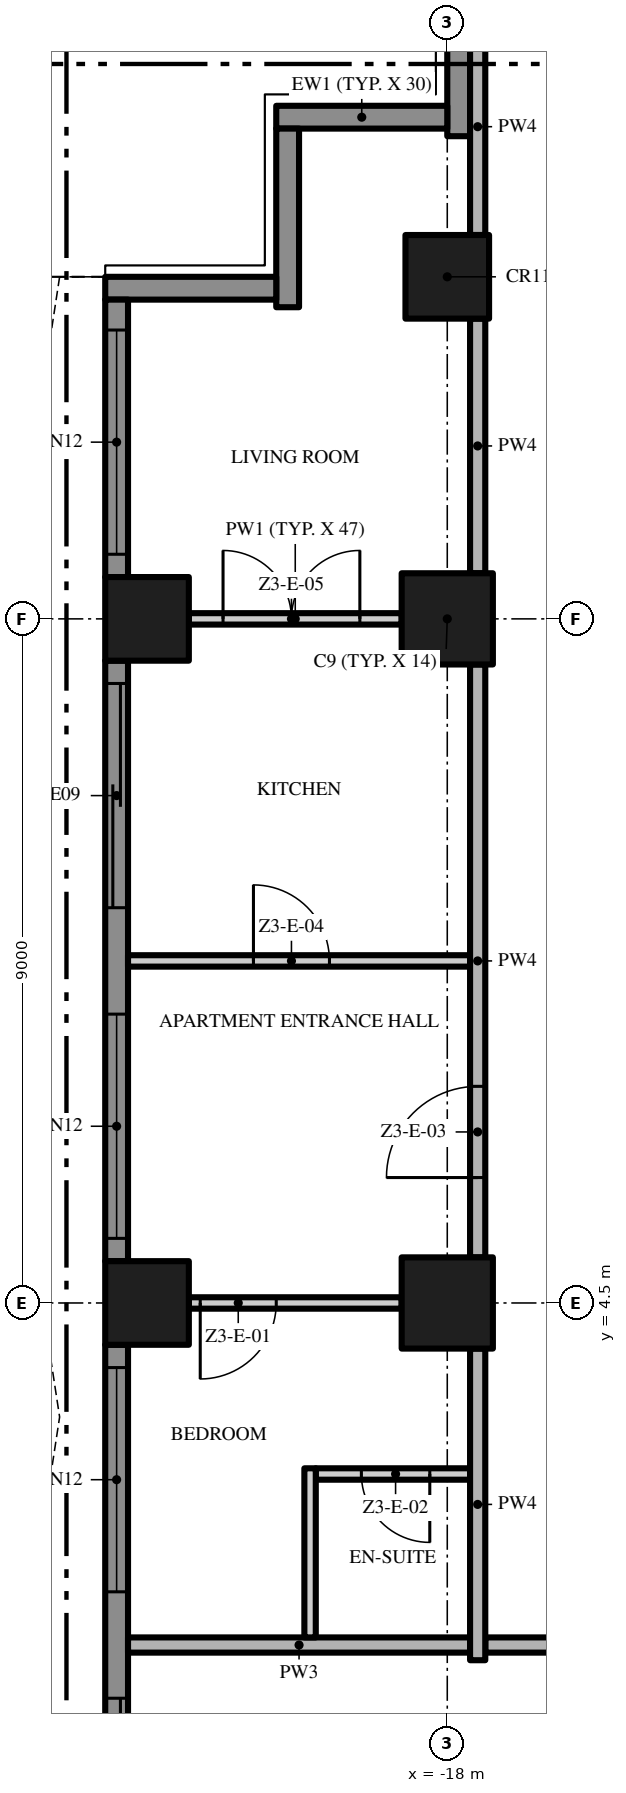
"""IFC4 building model, lengths in metres.
Left out: names, types, materials, properties, quantities, classifications, styles, units other than length and angle.
Written with IfcOpenShell. Run it as: python <this file> out.ifc"""

import sys

from ifc_helpers import new_model, si_unit, direction, frame, frame_2d, origin, origin_2d, place, context, subcontext, project, spatial, polyline, rectangle, outline, extrude, element, fill, save


model = new_model("IFC4")
c1 = context("Model", 3, precision=1e-05, world=origin(), true_north=direction((0.0, 1.0)))
c2 = subcontext(c1, "Body", "Model", "MODEL_VIEW")
j1 = project(units=[si_unit("LENGTHUNIT", "METRE"), si_unit("PLANEANGLEUNIT", "RADIAN")], contexts=[c1])
p1 = place(None, origin())
s1 = spatial("IfcSite", under=j1, at=p1, CompositionType="ELEMENT")
p2 = place(p1, origin())
s2 = spatial("IfcBuilding", under=s1, at=p2, CompositionType="ELEMENT")
p3 = place(p2, frame((0.0, 0.0, 166.8)))
s3 = spatial("IfcBuildingStorey", under=s2, at=p3, CompositionType="ELEMENT", Elevation=166.8)
for number, where, z_axis, x_axis in (
    (1, (-18.0, 13.5, 0.0), (0.0, 0.0, 1.0), (1.0, 0.0, 0.0)),
    (2, (-18.0, 4.5, 0.0), (0.0, 0.0, 1.0), (1.0, 0.0, 0.0)),
):
    element("IfcColumn", number, at=place(p3, frame(where, z_axis=z_axis, x_axis=x_axis)), inside=s3, PredefinedType="COLUMN", context=c2, shape_type="SweptSolid", body=[
        extrude(rectangle(XDim=1.2, YDim=1.2, at=origin_2d()), origin(), (0.0, 0.0, 1.0), 3.5),
    ])
for number, where, z_axis, x_axis in (
    (3, (-21.95, 13.5, 0.0), (0.0, 0.0, 1.0), (1.0, 0.0, 0.0)),
    (4, (-18.0, 18.0, 0.0), (0.0, 0.0, 1.0), (1.0, 0.0, 0.0)),
    (5, (-21.95, 4.5, 0.0), (0.0, 0.0, 1.0), (1.0, 0.0, 0.0)),
):
    element("IfcColumn", number, at=place(p3, frame(where, z_axis=z_axis, x_axis=x_axis)), inside=s3, PredefinedType="COLUMN", context=c2, shape_type="SweptSolid", body=[
        extrude(rectangle(XDim=1.1, YDim=1.1, at=origin_2d()), origin(), (0.0, 0.0, 1.0), 3.5),
    ])
p4 = place(p3, frame((-17.85, 19.85, 0.0), z_axis=(0.0, 0.0, 1.0), x_axis=(0.0, 1.0, 0.0)))
e6 = element("IfcWall", 6, at=p4, inside=s3, PredefinedType="SOLIDWALL", context=c2, shape_type="SweptSolid", body=[
    extrude(rectangle(XDim=1.55, YDim=0.3, at=frame_2d((0.775, 0.0))), origin(), (0.0, 0.0, 1.0), 3.5),
])
p5 = place(p3, frame((-20.25, 20.1, 0.0), z_axis=(0.0, 0.0, 1.0), x_axis=(1.0, 0.0, 0.0)))
e7 = element("IfcWall", 7, at=p5, inside=s3, PredefinedType="SOLIDWALL", context=c2, shape_type="SweptSolid", body=[
    extrude(rectangle(XDim=2.25, YDim=0.3, at=frame_2d((1.125, 0.0))), origin(), (0.0, 0.0, 1.0), 3.5),
])
p6 = place(p3, frame((-20.1, 17.6, 0.0), z_axis=(0.0, 0.0, 1.0), x_axis=(0.0, 1.0, 0.0)))
e8 = element("IfcWall", 8, at=p6, inside=s3, PredefinedType="SOLIDWALL", context=c2, shape_type="SweptSolid", body=[
    extrude(rectangle(XDim=2.35, YDim=0.3, at=frame_2d((1.175, 0.0))), origin(), (0.0, 0.0, 1.0), 3.5),
])
p7 = place(p3, frame((-22.5, 17.85, 0.0), z_axis=(0.0, 0.0, 1.0), x_axis=(1.0, 0.0, 0.0)))
e9 = element("IfcWall", 9, at=p7, inside=s3, PredefinedType="SOLIDWALL", context=c2, shape_type="SweptSolid", body=[
    extrude(rectangle(XDim=2.25, YDim=0.3, at=frame_2d((1.125, 0.0))), origin(), (0.0, 0.0, 1.0), 3.5),
])
p8 = place(p3, frame((-22.35, 14.05, 0.0), z_axis=(0.0, 0.0, 1.0), x_axis=(0.0, 1.0, 0.0)))
e10 = element("IfcWall", 10, at=p8, inside=s3, PredefinedType="SOLIDWALL", context=c2, shape_type="SweptSolid", body=[
    extrude(rectangle(XDim=3.65, YDim=0.3, at=frame_2d((1.825, 0.0))), origin(), (0.0, 0.0, 1.0), 3.5),
])
p9 = place(p8, frame((0.3, 0.0, 0.45)))
e11 = element("IfcOpeningElement", 11, at=p9, cuts=e10, PredefinedType="OPENING", context=c2, shape_type="SweptSolid", body=[
    extrude(rectangle(XDim=2.95, YDim=2.65, at=frame_2d((1.475, 1.325))), frame((0.0, 0.16, 0.0), z_axis=(0.0, -1.0, 0.0), x_axis=(1.0, 0.0, 0.0)), (0.0, 0.0, 1.0), 0.32),
])
p10 = place(p3, frame((-22.35, 5.05, 0.0), z_axis=(0.0, 0.0, 1.0), x_axis=(0.0, 1.0, 0.0)))
e12 = element("IfcWall", 12, at=p10, inside=s3, PredefinedType="SOLIDWALL", context=c2, shape_type="SweptSolid", body=[
    extrude(rectangle(XDim=7.9, YDim=0.3, at=frame_2d((3.95, 0.0))), origin(), (0.0, 0.0, 1.0), 3.5),
])
p11 = place(p10, frame((4.65, 0.0, 0.0)))
e13 = element("IfcOpeningElement", 13, at=p11, cuts=e12, PredefinedType="OPENING", context=c2, shape_type="SweptSolid", body=[
    extrude(rectangle(XDim=2.95, YDim=2.4, at=frame_2d((1.475, 1.2))), frame((0.0, 0.16, 0.0), z_axis=(0.0, -1.0, 0.0), x_axis=(1.0, 0.0, 0.0)), (0.0, 0.0, 1.0), 0.32),
])
p12 = place(p10, frame((0.3, 0.0, 0.45)))
e14 = element("IfcOpeningElement", 14, at=p12, cuts=e12, PredefinedType="OPENING", context=c2, shape_type="SweptSolid", body=[
    extrude(rectangle(XDim=2.95, YDim=2.65, at=frame_2d((1.475, 1.325))), frame((0.0, 0.16, 0.0), z_axis=(0.0, -1.0, 0.0), x_axis=(1.0, 0.0, 0.0)), (0.0, 0.0, 1.0), 0.32),
])
p13 = place(p3, frame((-22.35, -3.95, 0.0), z_axis=(0.0, 0.0, 1.0), x_axis=(0.0, 1.0, 0.0)))
e15 = element("IfcWall", 15, at=p13, inside=s3, PredefinedType="SOLIDWALL", context=c2, shape_type="SweptSolid", body=[
    extrude(rectangle(XDim=7.9, YDim=0.3, at=frame_2d((3.95, 0.0))), origin(), (0.0, 0.0, 1.0), 3.5),
])
p14 = place(p13, frame((4.65, 0.0, 0.45)))
e16 = element("IfcOpeningElement", 16, at=p14, cuts=e15, PredefinedType="OPENING", context=c2, shape_type="SweptSolid", body=[
    extrude(rectangle(XDim=2.95, YDim=2.65, at=frame_2d((1.475, 1.325))), frame((0.0, 0.16, 0.0), z_axis=(0.0, -1.0, 0.0), x_axis=(1.0, 0.0, 0.0)), (0.0, 0.0, 1.0), 0.32),
])
p15 = place(p13, frame((0.3, 0.0, 0.0)))
e17 = element("IfcOpeningElement", 17, at=p15, cuts=e15, PredefinedType="OPENING", context=c2, shape_type="SweptSolid", body=[
    extrude(rectangle(XDim=2.95, YDim=2.4, at=frame_2d((1.475, 1.2))), frame((0.0, 0.16, 0.0), z_axis=(0.0, -1.0, 0.0), x_axis=(1.0, 0.0, 0.0)), (0.0, 0.0, 1.0), 0.32),
])
p16 = place(p3, origin())
e18 = element("IfcWall", 18, at=p16, inside=s3, PredefinedType="USERDEFINED", context=c2, shape_type="SweptSolid", body=[
    extrude(outline(polyline([(-23.1, 18.0), (-23.329, 16.5), (-23.929, 15.0), (-24.671, 13.5), (-25.271, 12.0), (-25.5, 10.5), (-25.271, 9.0), (-24.671, 7.5), (-23.929, 6.0), (-23.329, 4.5), (-23.1, 3.0), (-23.329, 1.5), (-23.929, 0.0), (-24.671, -1.5), (-25.271, -3.0), (-25.5, -4.5), (-25.271, -6.0), (-24.671, -7.5), (-23.929, -9.0), (-23.329, -10.5), (-23.1, -12.0), (-23.329, -13.5), (-23.082, -13.538), (-22.847, -12.0), (-23.086, -10.434), (-23.701, -8.898), (-24.442, -7.398), (-25.028, -5.934), (-25.247, -4.5), (-25.028, -3.066), (-24.442, -1.602), (-23.701, -0.102), (-23.086, 1.434), (-22.847, 3.0), (-23.086, 4.566), (-23.701, 6.102), (-24.442, 7.602), (-25.028, 9.066), (-25.247, 10.5), (-25.028, 11.934), (-24.442, 13.398), (-23.701, 14.898), (-23.086, 16.434), (-22.853, 17.962), (-23.1, 18.0)])), origin(), (0.0, 0.0, 1.0), 0.9),
])
p17 = place(p3, frame((17.5, 0.0, 0.0), z_axis=(0.0, 0.0, 1.0), x_axis=(-1.0, 0.0, 0.0)))
e19 = element("IfcWall", 19, at=p17, inside=s3, PredefinedType="PARTITIONING", context=c2, shape_type="SweptSolid", body=[
    extrude(rectangle(XDim=35.0, YDim=0.2, at=frame_2d((17.5, 0.0))), origin(), (0.0, 0.0, 1.0), 3.5),
])
p18 = place(p17, frame((16.75, 0.0, 0.0)))
e20 = element("IfcOpeningElement", 20, at=p18, cuts=e19, PredefinedType="OPENING", context=c2, shape_type="SweptSolid", body=[
    extrude(rectangle(XDim=1.5, YDim=2.4, at=frame_2d((0.75, 1.2))), frame((0.0, 0.11, 0.0), z_axis=(0.0, -1.0, 0.0), x_axis=(1.0, 0.0, 0.0)), (0.0, 0.0, 1.0), 0.22),
])
p19 = place(p3, frame((-22.2, 0.0, 0.0), z_axis=(0.0, 0.0, 1.0), x_axis=(1.0, 0.0, 0.0)))
e21 = element("IfcWall", 21, at=p19, inside=s3, PredefinedType="PARTITIONING", context=c2, shape_type="SweptSolid", body=[
    extrude(rectangle(XDim=4.5, YDim=0.2, at=frame_2d((2.25, 0.0))), origin(), (0.0, 0.0, 1.0), 3.5),
])
p20 = place(p3, frame((-17.7, 2.25, 0.0), z_axis=(0.0, 0.0, 1.0), x_axis=(-1.0, 0.0, 0.0)))
e22 = element("IfcWall", 22, at=p20, inside=s3, PredefinedType="PARTITIONING", context=c2, shape_type="SweptSolid", body=[
    extrude(rectangle(XDim=2.03, YDim=0.15, at=frame_2d((1.015, 0.0))), origin(), (0.0, 0.0, 1.0), 3.5),
])
p21 = place(p20, frame((0.53, 0.0, 0.0)))
e23 = element("IfcOpeningElement", 23, at=p21, cuts=e22, PredefinedType="OPENING", context=c2, shape_type="SweptSolid", body=[
    extrude(rectangle(XDim=0.9, YDim=2.1, at=frame_2d((0.45, 1.05))), frame((0.0, 0.085, 0.0), z_axis=(0.0, -1.0, 0.0), x_axis=(1.0, 0.0, 0.0)), (0.0, 0.0, 1.0), 0.17),
])
p22 = place(p3, frame((-18.6, 4.5, 0.0), z_axis=(0.0, 0.0, 1.0), x_axis=(-1.0, 0.0, 0.0)))
e24 = element("IfcWall", 24, at=p22, inside=s3, PredefinedType="PARTITIONING", context=c2, shape_type="SweptSolid", body=[
    extrude(rectangle(XDim=2.8, YDim=0.15, at=frame_2d((1.4, 0.0))), origin(), (0.0, 0.0, 1.0), 3.5),
])
p23 = place(p22, frame((1.65, 0.0, 0.0)))
e25 = element("IfcOpeningElement", 25, at=p23, cuts=e24, PredefinedType="OPENING", context=c2, shape_type="SweptSolid", body=[
    extrude(rectangle(XDim=1.0, YDim=2.4, at=frame_2d((0.5, 1.2))), frame((0.0, 0.085, 0.0), z_axis=(0.0, -1.0, 0.0), x_axis=(1.0, 0.0, 0.0)), (0.0, 0.0, 1.0), 0.17),
])
p24 = place(p3, frame((-22.2, 9.0, 0.0), z_axis=(0.0, 0.0, 1.0), x_axis=(1.0, 0.0, 0.0)))
e26 = element("IfcWall", 26, at=p24, inside=s3, PredefinedType="PARTITIONING", context=c2, shape_type="SweptSolid", body=[
    extrude(rectangle(XDim=4.5, YDim=0.15, at=frame_2d((2.25, 0.0))), origin(), (0.0, 0.0, 1.0), 3.5),
])
p25 = place(p24, frame((1.65, 0.0, 0.0)))
e27 = element("IfcOpeningElement", 27, at=p25, cuts=e26, PredefinedType="OPENING", context=c2, shape_type="SweptSolid", body=[
    extrude(rectangle(XDim=1.0, YDim=2.4, at=frame_2d((0.5, 1.2))), frame((0.0, 0.085, 0.0), z_axis=(0.0, -1.0, 0.0), x_axis=(1.0, 0.0, 0.0)), (0.0, 0.0, 1.0), 0.17),
])
p26 = place(p3, frame((-21.4, 13.5, 0.0), z_axis=(0.0, 0.0, 1.0), x_axis=(1.0, 0.0, 0.0)))
e28 = element("IfcWall", 28, at=p26, inside=s3, PredefinedType="PARTITIONING", context=c2, shape_type="SweptSolid", body=[
    extrude(rectangle(XDim=2.8, YDim=0.15, at=frame_2d((1.4, 0.0))), origin(), (0.0, 0.0, 1.0), 3.5),
])
p27 = place(p26, frame((0.45, 0.0, 0.0)))
e29 = element("IfcOpeningElement", 29, at=p27, cuts=e28, PredefinedType="OPENING", context=c2, shape_type="SweptSolid", body=[
    extrude(rectangle(XDim=1.8, YDim=2.4, at=frame_2d((0.9, 1.2))), frame((0.0, 0.085, 0.0), z_axis=(0.0, -1.0, 0.0), x_axis=(1.0, 0.0, 0.0)), (0.0, 0.0, 1.0), 0.17),
])
p28 = place(p3, frame((-19.805, 0.1, 0.0), z_axis=(0.0, 0.0, 1.0), x_axis=(0.0, 1.0, 0.0)))
e30 = element("IfcWall", 30, at=p28, inside=s3, PredefinedType="PARTITIONING", context=c2, shape_type="SweptSolid", body=[
    extrude(rectangle(XDim=2.225, YDim=0.15, at=frame_2d((1.113, 0.0))), origin(), (0.0, 0.0, 1.0), 3.5),
])
p29 = place(p3, frame((-17.6, -0.2, 0.0), z_axis=(0.0, 0.0, 1.0), x_axis=(0.0, 1.0, 0.0)))
e31 = element("IfcWall", 31, at=p29, inside=s3, PredefinedType="PARTITIONING", context=c2, shape_type="SweptSolid", body=[
    extrude(rectangle(XDim=4.1, YDim=0.2, at=frame_2d((2.05, 0.0))), origin(), (0.0, 0.0, 1.0), 3.5),
])
p30 = place(p3, frame((-17.6, 5.1, 0.0), z_axis=(0.0, 0.0, 1.0), x_axis=(0.0, 1.0, 0.0)))
e32 = element("IfcWall", 32, at=p30, inside=s3, PredefinedType="PARTITIONING", context=c2, shape_type="SweptSolid", body=[
    extrude(rectangle(XDim=7.8, YDim=0.2, at=frame_2d((3.9, 0.0))), origin(), (0.0, 0.0, 1.0), 3.5),
])
p31 = place(p30, frame((1.05, 0.0, 0.0)))
e33 = element("IfcOpeningElement", 33, at=p31, cuts=e32, PredefinedType="OPENING", context=c2, shape_type="SweptSolid", body=[
    extrude(rectangle(XDim=1.2, YDim=2.4, at=frame_2d((0.6, 1.2))), frame((0.0, 0.11, 0.0), z_axis=(0.0, -1.0, 0.0), x_axis=(1.0, 0.0, 0.0)), (0.0, 0.0, 1.0), 0.22),
])
p32 = place(p3, frame((-17.6, 14.1, 0.0), z_axis=(0.0, 0.0, 1.0), x_axis=(0.0, 1.0, 0.0)))
e34 = element("IfcWall", 34, at=p32, inside=s3, PredefinedType="PARTITIONING", context=c2, shape_type="SweptSolid", body=[
    extrude(rectangle(XDim=3.35, YDim=0.2, at=frame_2d((1.675, 0.0))), origin(), (0.0, 0.0, 1.0), 3.5),
])
p33 = place(p3, frame((-17.6, 18.55, 0.0), z_axis=(0.0, 0.0, 1.0), x_axis=(0.0, 1.0, 0.0)))
e35 = element("IfcWall", 35, at=p33, inside=s3, PredefinedType="PARTITIONING", context=c2, shape_type="SweptSolid", body=[
    extrude(rectangle(XDim=2.85, YDim=0.2, at=frame_2d((1.425, 0.0))), origin(), (0.0, 0.0, 1.0), 3.5),
])
p34 = place(p9, origin())
e36 = element("IfcWindow", 36, at=p34, inside=s3, PartitioningType="SINGLE_PANEL", PredefinedType="WINDOW", context=c2, shape_type="SweptSolid", body=[
    extrude(rectangle(XDim=2.95, YDim=2.65, at=frame_2d((1.475, 1.325))), frame((0.0, 0.03, 0.0), z_axis=(0.0, -1.0, 0.0), x_axis=(1.0, 0.0, 0.0)), (0.0, 0.0, 1.0), 0.06),
])
fill(e11, e36)
p35 = place(p11, origin())
e37 = element("IfcDoor", 37, at=p35, inside=s3, OperationType="SINGLE_SWING_LEFT", PredefinedType="DOOR", context=c2, shape_type="SweptSolid", body=[
    extrude(rectangle(XDim=2.95, YDim=2.4, at=frame_2d((1.475, 1.2))), frame((0.0, 0.025, 0.0), z_axis=(0.0, -1.0, 0.0), x_axis=(1.0, 0.0, 0.0)), (0.0, 0.0, 1.0), 0.05),
])
fill(e13, e37)
p36 = place(p12, origin())
e38 = element("IfcWindow", 38, at=p36, inside=s3, PartitioningType="SINGLE_PANEL", PredefinedType="WINDOW", context=c2, shape_type="SweptSolid", body=[
    extrude(rectangle(XDim=2.95, YDim=2.65, at=frame_2d((1.475, 1.325))), frame((0.0, 0.03, 0.0), z_axis=(0.0, -1.0, 0.0), x_axis=(1.0, 0.0, 0.0)), (0.0, 0.0, 1.0), 0.06),
])
fill(e14, e38)
p37 = place(p14, origin())
e39 = element("IfcWindow", 39, at=p37, inside=s3, PartitioningType="SINGLE_PANEL", PredefinedType="WINDOW", context=c2, shape_type="SweptSolid", body=[
    extrude(rectangle(XDim=2.95, YDim=2.65, at=frame_2d((1.475, 1.325))), frame((0.0, 0.03, 0.0), z_axis=(0.0, -1.0, 0.0), x_axis=(1.0, 0.0, 0.0)), (0.0, 0.0, 1.0), 0.06),
])
fill(e16, e39)
p38 = place(p15, origin())
e40 = element("IfcDoor", 40, at=p38, inside=s3, OperationType="SINGLE_SWING_LEFT", PredefinedType="DOOR", context=c2, shape_type="SweptSolid", body=[
    extrude(rectangle(XDim=2.95, YDim=2.4, at=frame_2d((1.475, 1.2))), frame((0.0, 0.025, 0.0), z_axis=(0.0, -1.0, 0.0), x_axis=(1.0, 0.0, 0.0)), (0.0, 0.0, 1.0), 0.05),
])
fill(e17, e40)
p39 = place(p23, origin())
e41 = element("IfcDoor", 41, at=p39, inside=s3, OperationType="SINGLE_SWING_RIGHT", PredefinedType="DOOR", context=c2, shape_type="SweptSolid", body=[
    extrude(rectangle(XDim=1.0, YDim=2.4, at=frame_2d((0.5, 1.2))), frame((0.0, 0.025, 0.0), z_axis=(0.0, -1.0, 0.0), x_axis=(1.0, 0.0, 0.0)), (0.0, 0.0, 1.0), 0.05),
])
fill(e25, e41)
p40 = place(p21, origin())
e42 = element("IfcDoor", 42, at=p40, inside=s3, OperationType="SINGLE_SWING_LEFT", PredefinedType="DOOR", context=c2, shape_type="SweptSolid", body=[
    extrude(rectangle(XDim=0.9, YDim=2.1, at=frame_2d((0.45, 1.05))), frame((0.0, 0.025, 0.0), z_axis=(0.0, -1.0, 0.0), x_axis=(1.0, 0.0, 0.0)), (0.0, 0.0, 1.0), 0.05),
])
fill(e23, e42)
p41 = place(p31, origin())
e43 = element("IfcDoor", 43, at=p41, inside=s3, OperationType="SINGLE_SWING_LEFT", PredefinedType="DOOR", context=c2, shape_type="SweptSolid", body=[
    extrude(rectangle(XDim=1.2, YDim=2.4, at=frame_2d((0.6, 1.2))), frame((0.0, 0.025, 0.0), z_axis=(0.0, -1.0, 0.0), x_axis=(1.0, 0.0, 0.0)), (0.0, 0.0, 1.0), 0.05),
])
fill(e33, e43)
p42 = place(p25, origin())
e44 = element("IfcDoor", 44, at=p42, inside=s3, OperationType="SINGLE_SWING_LEFT", PredefinedType="DOOR", context=c2, shape_type="SweptSolid", body=[
    extrude(rectangle(XDim=1.0, YDim=2.4, at=frame_2d((0.5, 1.2))), frame((0.0, 0.025, 0.0), z_axis=(0.0, -1.0, 0.0), x_axis=(1.0, 0.0, 0.0)), (0.0, 0.0, 1.0), 0.05),
])
fill(e27, e44)
p43 = place(p27, origin())
e45 = element("IfcDoor", 45, at=p43, inside=s3, OperationType="DOUBLE_DOOR_SINGLE_SWING", PredefinedType="DOOR", context=c2, shape_type="SweptSolid", body=[
    extrude(rectangle(XDim=1.8, YDim=2.4, at=frame_2d((0.9, 1.2))), frame((0.0, 0.025, 0.0), z_axis=(0.0, -1.0, 0.0), x_axis=(1.0, 0.0, 0.0)), (0.0, 0.0, 1.0), 0.05),
])
fill(e29, e45)
save(model, sys.argv[1])
